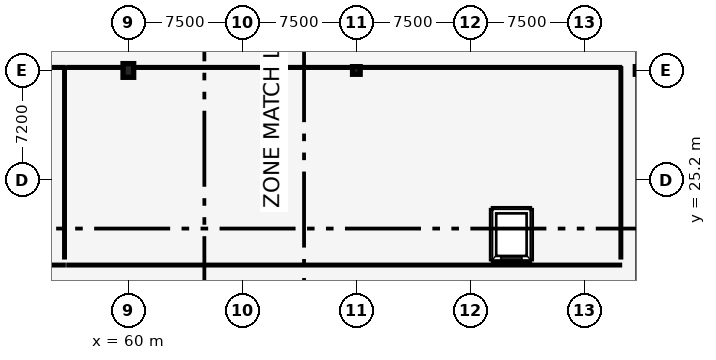
"""IFC4 building model, lengths in metres.
Left out: names, types, materials, properties, quantities, classifications, styles, units other than length and angle.
Written with IfcOpenShell. Run it as: python <this file> out.ifc"""

import sys

from ifc_helpers import new_model, si_unit, direction, frame, frame_2d, origin, origin_2d, place, context, subcontext, project, spatial, rectangle, circle, extrude, element, fill, save


model = new_model("IFC4")
c1 = context("Model", 3, precision=1e-05, world=origin(), true_north=direction((0.0, 1.0)))
c2 = subcontext(c1, "Body", "Model", "MODEL_VIEW")
j1 = project(units=[si_unit("LENGTHUNIT", "METRE"), si_unit("PLANEANGLEUNIT", "RADIAN")], contexts=[c1])
p1 = place(None, origin())
s1 = spatial("IfcSite", under=j1, at=p1, CompositionType="ELEMENT")
p2 = place(p1, origin())
s2 = spatial("IfcBuilding", under=s1, at=p2, CompositionType="ELEMENT")
p3 = place(p2, origin())
s3 = spatial("IfcBuildingStorey", under=s2, at=p3, CompositionType="ELEMENT", Elevation=0.0)
p4 = place(p3, frame((60.0, 32.4, 0.0), z_axis=(0.0, 0.0, 1.0), x_axis=(1.0, 0.0, 0.0)))
e1 = element("IfcColumn", 1, at=p4, inside=s3, PredefinedType="COLUMN", context=c2, shape_type="SweptSolid", body=[
    extrude(rectangle(XDim=0.7, YDim=0.9, at=origin_2d()), origin(), (0.0, 0.0, 1.0), 4.8),
])
p5 = place(p3, frame((75.0, 32.4, 0.0), z_axis=(0.0, 0.0, 1.0), x_axis=(1.0, 0.0, 0.0)))
e2 = element("IfcColumn", 2, at=p5, inside=s3, PredefinedType="COLUMN", context=c2, shape_type="SweptSolid", body=[
    extrude(circle(Radius=0.25, at=origin_2d()), origin(), (0.0, 0.0, 1.0), 4.8),
])
p6 = place(p3, frame((93.6, 32.4, 0.0), z_axis=(0.0, 0.0, 1.0), x_axis=(1.0, 0.0, 0.0)))
e3 = element("IfcColumn", 3, at=p6, inside=s3, PredefinedType="COLUMN", context=c2, shape_type="SweptSolid", body=[
    extrude(rectangle(XDim=0.5, YDim=0.5, at=origin_2d()), origin(), (0.0, 0.0, 1.0), 4.8),
])
p7 = place(p3, frame((83.925, 19.925, 0.0), z_axis=(0.0, 0.0, 1.0), x_axis=(1.0, 0.0, 0.0)))
e4 = element("IfcWall", 4, at=p7, inside=s3, PredefinedType="SHEAR", context=c2, shape_type="SweptSolid", body=[
    extrude(rectangle(XDim=2.55, YDim=0.25, at=frame_2d((1.275, 0.0))), origin(), (0.0, 0.0, 1.0), 4.5),
])
p8 = place(p3, frame((86.475, 23.275, 0.0), z_axis=(0.0, 0.0, 1.0), x_axis=(-1.0, 0.0, 0.0)))
e5 = element("IfcWall", 5, at=p8, inside=s3, PredefinedType="SHEAR", context=c2, shape_type="SweptSolid", body=[
    extrude(rectangle(XDim=2.55, YDim=0.25, at=frame_2d((1.275, 0.0))), origin(), (0.0, 0.0, 1.0), 4.5),
])
p9 = place(p8, frame((0.525, 0.0, 0.0)))
e6 = element("IfcOpeningElement", 6, at=p9, cuts=e5, PredefinedType="OPENING", context=c2, shape_type="SweptSolid", body=[
    extrude(rectangle(XDim=1.5, YDim=2.2, at=frame_2d((0.75, 1.1))), frame((0.0, 0.135, 0.0), z_axis=(0.0, -1.0, 0.0), x_axis=(1.0, 0.0, 0.0)), (0.0, 0.0, 1.0), 0.27),
])
for number, where, z_axis, x_axis in (
    (7, (83.925, 23.275, 0.0), (0.0, 0.0, 1.0), (0.0, -1.0, 0.0)),
    (8, (86.475, 19.925, 0.0), (0.0, 0.0, 1.0), (0.0, 1.0, 0.0)),
):
    element("IfcWall", number, at=place(p3, frame(where, z_axis=z_axis, x_axis=x_axis)), inside=s3, PredefinedType="SHEAR", context=c2, shape_type="SweptSolid", body=[
        extrude(rectangle(XDim=3.35, YDim=0.25, at=frame_2d((1.675, 0.0))), origin(), (0.0, 0.0, 1.0), 4.5),
    ])
p10 = place(p3, frame((55.8, 19.6, 0.0), z_axis=(0.0, 0.0, 1.0), x_axis=(-1.0, 0.0, 0.0)))
e9 = element("IfcWall", 9, at=p10, inside=s3, PredefinedType="PARTITIONING", context=c2, shape_type="SweptSolid", body=[
    extrude(rectangle(XDim=40.6, YDim=0.15, at=frame_2d((20.3, 0.0))), origin(), (0.0, 0.0, 1.0), 3.682),
])
p11 = place(p3, frame((55.8, 20.05, 0.0), z_axis=(0.0, 0.0, 1.0), x_axis=(0.0, 1.0, 0.0)))
e10 = element("IfcWall", 10, at=p11, inside=s3, PredefinedType="PARTITIONING", context=c2, shape_type="SweptSolid", body=[
    extrude(rectangle(XDim=12.55, YDim=0.15, at=frame_2d((6.275, 0.0))), origin(), (0.0, 0.0, 1.0), 3.87),
])
p12 = place(p3, frame((15.2, 32.6, 0.0), z_axis=(0.0, 0.0, 1.0), x_axis=(1.0, 0.0, 0.0)))
e11 = element("IfcWall", 11, at=p12, inside=s3, PredefinedType="PARTITIONING", context=c2, shape_type="SweptSolid", body=[
    extrude(rectangle(XDim=40.6, YDim=0.16, at=frame_2d((20.3, 0.0))), origin(), (0.0, 0.0, 1.0), 3.87),
])
p13 = place(p12, frame((19.3, 0.0, 0.0)))
e12 = element("IfcOpeningElement", 12, at=p13, cuts=e11, PredefinedType="OPENING", context=c2, shape_type="SweptSolid", body=[
    extrude(rectangle(XDim=2.0, YDim=2.3, at=frame_2d((1.0, 1.15))), frame((0.0, 0.09, 0.0), z_axis=(0.0, -1.0, 0.0), x_axis=(1.0, 0.0, 0.0)), (0.0, 0.0, 1.0), 0.18),
])
p14 = place(p12, frame((35.4, 0.0, 0.0)))
e13 = element("IfcOpeningElement", 13, at=p14, cuts=e11, PredefinedType="OPENING", context=c2, shape_type="SweptSolid", body=[
    extrude(rectangle(XDim=2.0, YDim=2.3, at=frame_2d((1.0, 1.15))), frame((0.0, 0.09, 0.0), z_axis=(0.0, -1.0, 0.0), x_axis=(1.0, 0.0, 0.0)), (0.0, 0.0, 1.0), 0.18),
])
p15 = place(p3, frame((92.4, 19.6, 0.0), z_axis=(0.0, 0.0, 1.0), x_axis=(-1.0, 0.0, 0.0)))
e14 = element("IfcWall", 14, at=p15, inside=s3, PredefinedType="PARTITIONING", context=c2, shape_type="SweptSolid", body=[
    extrude(rectangle(XDim=36.4, YDim=0.15, at=frame_2d((18.2, 0.0))), origin(), (0.0, 0.0, 1.0), 3.682),
])
p16 = place(p3, frame((92.4, 20.05, 0.0), z_axis=(0.0, 0.0, 1.0), x_axis=(0.0, 1.0, 0.0)))
e15 = element("IfcWall", 15, at=p16, inside=s3, PredefinedType="PARTITIONING", context=c2, shape_type="SweptSolid", body=[
    extrude(rectangle(XDim=12.55, YDim=0.15, at=frame_2d((6.275, 0.0))), origin(), (0.0, 0.0, 1.0), 3.782),
])
p17 = place(p3, frame((56.0, 32.6, 0.0), z_axis=(0.0, 0.0, 1.0), x_axis=(1.0, 0.0, 0.0)))
e16 = element("IfcWall", 16, at=p17, inside=s3, PredefinedType="PARTITIONING", context=c2, shape_type="SweptSolid", body=[
    extrude(rectangle(XDim=36.4, YDim=0.16, at=frame_2d((18.2, 0.0))), origin(), (0.0, 0.0, 1.0), 3.782),
])
p18 = place(p17, frame((10.32, 0.0, 0.0)))
e17 = element("IfcOpeningElement", 17, at=p18, cuts=e16, PredefinedType="OPENING", context=c2, shape_type="SweptSolid", body=[
    extrude(rectangle(XDim=2.0, YDim=2.3, at=frame_2d((1.0, 1.15))), frame((0.0, 0.09, 0.0), z_axis=(0.0, -1.0, 0.0), x_axis=(1.0, 0.0, 0.0)), (0.0, 0.0, 1.0), 0.18),
])
p19 = place(p17, frame((31.2, 0.0, 0.0)))
e18 = element("IfcOpeningElement", 18, at=p19, cuts=e16, PredefinedType="OPENING", context=c2, shape_type="SweptSolid", body=[
    extrude(rectangle(XDim=2.0, YDim=2.3, at=frame_2d((1.0, 1.15))), frame((0.0, 0.09, 0.0), z_axis=(0.0, -1.0, 0.0), x_axis=(1.0, 0.0, 0.0)), (0.0, 0.0, 1.0), 0.18),
])
p20 = place(p9, origin())
e19 = element("IfcDoor", 19, at=p20, inside=s3, OperationType="SLIDING_TO_RIGHT", PredefinedType="DOOR", context=c2, shape_type="SweptSolid", body=[
    extrude(rectangle(XDim=1.5, YDim=2.2, at=frame_2d((0.75, 1.1))), frame((0.0, 0.025, 0.0), z_axis=(0.0, -1.0, 0.0), x_axis=(1.0, 0.0, 0.0)), (0.0, 0.0, 1.0), 0.05),
])
fill(e6, e19)
p21 = place(p18, origin())
e20 = element("IfcDoor", 20, at=p21, inside=s3, OperationType="DOUBLE_SWING_LEFT", PredefinedType="DOOR", context=c2, shape_type="SweptSolid", body=[
    extrude(rectangle(XDim=2.0, YDim=2.3, at=frame_2d((1.0, 1.15))), frame((0.0, 0.025, 0.0), z_axis=(0.0, -1.0, 0.0), x_axis=(1.0, 0.0, 0.0)), (0.0, 0.0, 1.0), 0.05),
])
fill(e17, e20)
p22 = place(p19, origin())
e21 = element("IfcDoor", 21, at=p22, inside=s3, OperationType="DOUBLE_SWING_LEFT", PredefinedType="DOOR", context=c2, shape_type="SweptSolid", body=[
    extrude(rectangle(XDim=2.0, YDim=2.3, at=frame_2d((1.0, 1.15))), frame((0.0, 0.025, 0.0), z_axis=(0.0, -1.0, 0.0), x_axis=(1.0, 0.0, 0.0)), (0.0, 0.0, 1.0), 0.05),
])
fill(e18, e21)
save(model, sys.argv[1])
